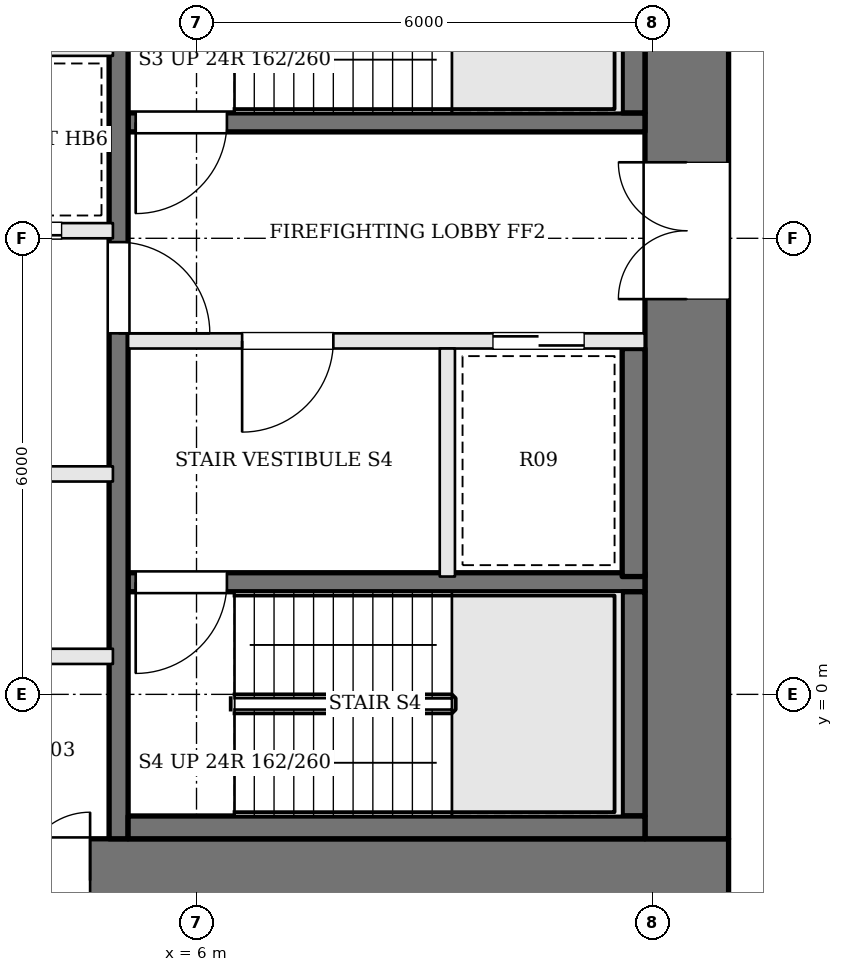
"""IFC4 building model, lengths in metres.
Left out: names, types, materials, properties, quantities, classifications, styles, units other than length and angle.
Written with IfcOpenShell. Run it as: python <this file> out.ifc"""

import sys

from ifc_helpers import new_model, si_unit, direction, frame, frame_2d, origin, place, context, subcontext, project, spatial, rectangle, extrude, element, fill, save


model = new_model("IFC4")
c1 = context("Model", 3, precision=1e-05, world=origin(), true_north=direction((0.0, 1.0)))
c2 = subcontext(c1, "Body", "Model", "MODEL_VIEW")
j1 = project(units=[si_unit("LENGTHUNIT", "METRE"), si_unit("PLANEANGLEUNIT", "RADIAN")], contexts=[c1])
p1 = place(None, origin())
s1 = spatial("IfcSite", under=j1, at=p1, CompositionType="ELEMENT")
p2 = place(p1, origin())
s2 = spatial("IfcBuilding", under=s1, at=p2, CompositionType="ELEMENT")
p3 = place(p2, frame((0.0, 0.0, 134.4)))
s3 = spatial("IfcBuildingStorey", under=s2, at=p3, CompositionType="ELEMENT", Elevation=134.4)
p4 = place(p3, frame((-13.0, -2.45, 0.0), z_axis=(0.0, 0.0, 1.0), x_axis=(1.0, 0.0, 0.0)))
e1 = element("IfcWall", 1, at=p4, inside=s3, PredefinedType="SHEAR", context=c2, shape_type="SweptSolid", body=[
    extrude(rectangle(XDim=26.0, YDim=1.1, at=frame_2d((13.0, 0.0))), origin(), (0.0, 0.0, 1.0), 3.9),
])
p5 = place(p4, frame((9.275, 0.0, 0.0)))
e2 = element("IfcOpeningElement", 2, at=p5, cuts=e1, PredefinedType="OPENING", context=c2, shape_type="SweptSolid", body=[
    extrude(rectangle(XDim=0.9, YDim=2.1, at=frame_2d((0.45, 1.05))), frame((0.0, 0.56, 0.0), z_axis=(0.0, -1.0, 0.0), x_axis=(1.0, 0.0, 0.0)), (0.0, 0.0, 1.0), 1.12),
])
p6 = place(p4, frame((11.75, 0.0, 0.0)))
e3 = element("IfcOpeningElement", 3, at=p6, cuts=e1, PredefinedType="OPENING", context=c2, shape_type="SweptSolid", body=[
    extrude(rectangle(XDim=1.0, YDim=2.1, at=frame_2d((0.5, 1.05))), frame((0.0, 0.56, 0.0), z_axis=(0.0, -1.0, 0.0), x_axis=(1.0, 0.0, 0.0)), (0.0, 0.0, 1.0), 1.12),
])
p7 = place(p4, frame((14.325, 0.0, 0.0)))
e4 = element("IfcOpeningElement", 4, at=p7, cuts=e1, PredefinedType="OPENING", context=c2, shape_type="SweptSolid", body=[
    extrude(rectangle(XDim=0.9, YDim=2.1, at=frame_2d((0.45, 1.05))), frame((0.0, 0.56, 0.0), z_axis=(0.0, -1.0, 0.0), x_axis=(1.0, 0.0, 0.0)), (0.0, 0.0, 1.0), 1.12),
])
p8 = place(p4, frame((16.7, 0.0, 0.0)))
e5 = element("IfcOpeningElement", 5, at=p8, cuts=e1, PredefinedType="OPENING", context=c2, shape_type="SweptSolid", body=[
    extrude(rectangle(XDim=0.9, YDim=2.1, at=frame_2d((0.45, 1.05))), frame((0.0, 0.56, 0.0), z_axis=(0.0, -1.0, 0.0), x_axis=(1.0, 0.0, 0.0)), (0.0, 0.0, 1.0), 1.12),
])
p9 = place(p3, frame((12.45, -1.9, 0.0), z_axis=(0.0, 0.0, 1.0), x_axis=(0.0, 1.0, 0.0)))
e6 = element("IfcWall", 6, at=p9, inside=s3, PredefinedType="SHEAR", context=c2, shape_type="SweptSolid", body=[
    extrude(rectangle(XDim=12.8, YDim=1.1, at=frame_2d((6.4, 0.0))), origin(), (0.0, 0.0, 1.0), 3.9),
])
p10 = place(p9, frame((7.1, 0.0, 0.0)))
e7 = element("IfcOpeningElement", 7, at=p10, cuts=e6, PredefinedType="OPENING", context=c2, shape_type="SweptSolid", body=[
    extrude(rectangle(XDim=1.8, YDim=2.1, at=frame_2d((0.9, 1.05))), frame((0.0, 0.56, 0.0), z_axis=(0.0, -1.0, 0.0), x_axis=(1.0, 0.0, 0.0)), (0.0, 0.0, 1.0), 1.12),
])
p11 = place(p3, frame((11.9, 7.525, 0.0), z_axis=(0.0, 0.0, 1.0), x_axis=(-1.0, 0.0, 0.0)))
e8 = element("IfcWall", 8, at=p11, inside=s3, PredefinedType="SOLIDWALL", context=c2, shape_type="SweptSolid", body=[
    extrude(rectangle(XDim=6.8, YDim=0.25, at=frame_2d((3.4, 0.0))), origin(), (0.0, 0.0, 1.0), 3.7),
])
p12 = place(p11, frame((5.5, 0.0, 0.0)))
e9 = element("IfcOpeningElement", 9, at=p12, cuts=e8, PredefinedType="OPENING", context=c2, shape_type="SweptSolid", body=[
    extrude(rectangle(XDim=1.2, YDim=2.1, at=frame_2d((0.6, 1.05))), frame((0.0, 0.135, 0.0), z_axis=(0.0, -1.0, 0.0), x_axis=(1.0, 0.0, 0.0)), (0.0, 0.0, 1.0), 0.27),
])
p13 = place(p3, frame((11.9, 4.65, 0.0), z_axis=(0.0, 0.0, 1.0), x_axis=(-1.0, 0.0, 0.0)))
e10 = element("IfcWall", 10, at=p13, inside=s3, PredefinedType="SOLIDWALL", context=c2, shape_type="SweptSolid", body=[
    extrude(rectangle(XDim=6.8, YDim=0.2, at=frame_2d((3.4, 0.0))), origin(), (0.0, 0.0, 1.0), 3.7),
])
p14 = place(p13, frame((4.1, 0.0, 0.0)))
e11 = element("IfcOpeningElement", 11, at=p14, cuts=e10, PredefinedType="OPENING", context=c2, shape_type="SweptSolid", body=[
    extrude(rectangle(XDim=1.2, YDim=2.1, at=frame_2d((0.6, 1.05))), frame((0.0, 0.11, 0.0), z_axis=(0.0, -1.0, 0.0), x_axis=(1.0, 0.0, 0.0)), (0.0, 0.0, 1.0), 0.22),
])
p15 = place(p13, frame((0.8, 0.0, 0.0)))
e12 = element("IfcOpeningElement", 12, at=p15, cuts=e10, PredefinedType="OPENING", context=c2, shape_type="SweptSolid", body=[
    extrude(rectangle(XDim=1.2, YDim=2.1, at=frame_2d((0.6, 1.05))), frame((0.0, 0.11, 0.0), z_axis=(0.0, -1.0, 0.0), x_axis=(1.0, 0.0, 0.0)), (0.0, 0.0, 1.0), 0.22),
])
p16 = place(p3, frame((11.9, 1.475, 0.0), z_axis=(0.0, 0.0, 1.0), x_axis=(-1.0, 0.0, 0.0)))
e13 = element("IfcWall", 13, at=p16, inside=s3, PredefinedType="SOLIDWALL", context=c2, shape_type="SweptSolid", body=[
    extrude(rectangle(XDim=6.8, YDim=0.25, at=frame_2d((3.4, 0.0))), origin(), (0.0, 0.0, 1.0), 3.7),
])
p17 = place(p16, frame((5.5, 0.0, 0.0)))
e14 = element("IfcOpeningElement", 14, at=p17, cuts=e13, PredefinedType="OPENING", context=c2, shape_type="SweptSolid", body=[
    extrude(rectangle(XDim=1.2, YDim=2.1, at=frame_2d((0.6, 1.05))), frame((0.0, 0.135, 0.0), z_axis=(0.0, -1.0, 0.0), x_axis=(1.0, 0.0, 0.0)), (0.0, 0.0, 1.0), 0.27),
])
p18 = place(p3, frame((9.3, 4.55, 0.0), z_axis=(0.0, 0.0, 1.0), x_axis=(0.0, -1.0, 0.0)))
e15 = element("IfcWall", 15, at=p18, inside=s3, PredefinedType="SOLIDWALL", context=c2, shape_type="SweptSolid", body=[
    extrude(rectangle(XDim=3.0, YDim=0.2, at=frame_2d((1.5, 0.0))), origin(), (0.0, 0.0, 1.0), 3.7),
])
p19 = place(p3, frame((4.975, 10.9, 0.0), z_axis=(0.0, 0.0, 1.0), x_axis=(0.0, -1.0, 0.0)))
e16 = element("IfcWall", 16, at=p19, inside=s3, PredefinedType="SOLIDWALL", context=c2, shape_type="SweptSolid", body=[
    extrude(rectangle(XDim=12.8, YDim=0.25, at=frame_2d((6.4, 0.0))), origin(), (0.0, 0.0, 1.0), 3.7),
])
p20 = place(p19, frame((4.95, 0.0, 0.0)))
e17 = element("IfcOpeningElement", 17, at=p20, cuts=e16, PredefinedType="OPENING", context=c2, shape_type="SweptSolid", body=[
    extrude(rectangle(XDim=1.2, YDim=2.1, at=frame_2d((0.6, 1.05))), frame((0.0, 0.135, 0.0), z_axis=(0.0, -1.0, 0.0), x_axis=(1.0, 0.0, 0.0)), (0.0, 0.0, 1.0), 0.27),
])
p21 = place(p3, frame((11.75, 10.6, 0.0), z_axis=(0.0, 0.0, 1.0), x_axis=(0.0, -1.0, 0.0)))
e18 = element("IfcWall", 18, at=p21, inside=s3, PredefinedType="SOLIDWALL", context=c2, shape_type="SweptSolid", body=[
    extrude(rectangle(XDim=2.95, YDim=0.3, at=frame_2d((1.475, 0.0))), origin(), (0.0, 0.0, 1.0), 3.7),
])
p22 = place(p3, frame((11.75, 4.55, 0.0), z_axis=(0.0, 0.0, 1.0), x_axis=(0.0, -1.0, 0.0)))
e19 = element("IfcWall", 19, at=p22, inside=s3, PredefinedType="SOLIDWALL", context=c2, shape_type="SweptSolid", body=[
    extrude(rectangle(XDim=3.0, YDim=0.3, at=frame_2d((1.5, 0.0))), origin(), (0.0, 0.0, 1.0), 3.7),
])
p23 = place(p3, frame((11.75, 1.35, 0.0), z_axis=(0.0, 0.0, 1.0), x_axis=(0.0, -1.0, 0.0)))
e20 = element("IfcWall", 20, at=p23, inside=s3, PredefinedType="SOLIDWALL", context=c2, shape_type="SweptSolid", body=[
    extrude(rectangle(XDim=2.95, YDim=0.3, at=frame_2d((1.475, 0.0))), origin(), (0.0, 0.0, 1.0), 3.7),
])
p24 = place(p3, frame((11.9, -1.75, 0.0), z_axis=(0.0, 0.0, 1.0), x_axis=(-1.0, 0.0, 0.0)))
e21 = element("IfcWall", 21, at=p24, inside=s3, PredefinedType="SOLIDWALL", context=c2, shape_type="SweptSolid", body=[
    extrude(rectangle(XDim=6.8, YDim=0.3, at=frame_2d((3.4, 0.0))), origin(), (0.0, 0.0, 1.0), 3.7),
])
p25 = place(p3, frame((-4.9, 0.5, 0.0), z_axis=(0.0, 0.0, 1.0), x_axis=(1.0, 0.0, 0.0)))
e22 = element("IfcWall", 22, at=p25, inside=s3, PredefinedType="SOLIDWALL", context=c2, shape_type="SweptSolid", body=[
    extrude(rectangle(XDim=9.8, YDim=0.2, at=frame_2d((4.9, 0.0))), origin(), (0.0, 0.0, 1.0), 3.7),
])
p26 = place(p3, frame((-4.9, 2.9, 0.0), z_axis=(0.0, 0.0, 1.0), x_axis=(1.0, 0.0, 0.0)))
e23 = element("IfcWall", 23, at=p26, inside=s3, PredefinedType="SOLIDWALL", context=c2, shape_type="SweptSolid", body=[
    extrude(rectangle(XDim=9.8, YDim=0.2, at=frame_2d((4.9, 0.0))), origin(), (0.0, 0.0, 1.0), 3.7),
])
p27 = place(p26, frame((0.675, 0.0, 0.0)))
e24 = element("IfcOpeningElement", 24, at=p27, cuts=e23, PredefinedType="OPENING", context=c2, shape_type="SweptSolid", body=[
    extrude(rectangle(XDim=1.1, YDim=2.1, at=frame_2d((0.55, 1.05))), frame((0.0, 0.11, 0.0), z_axis=(0.0, -1.0, 0.0), x_axis=(1.0, 0.0, 0.0)), (0.0, 0.0, 1.0), 0.22),
])
p28 = place(p26, frame((2.613, 0.0, 0.0)))
e25 = element("IfcOpeningElement", 25, at=p28, cuts=e23, PredefinedType="OPENING", context=c2, shape_type="SweptSolid", body=[
    extrude(rectangle(XDim=0.9, YDim=2.1, at=frame_2d((0.45, 1.05))), frame((0.0, 0.11, 0.0), z_axis=(0.0, -1.0, 0.0), x_axis=(1.0, 0.0, 0.0)), (0.0, 0.0, 1.0), 0.22),
])
p29 = place(p26, frame((4.35, 0.0, 0.0)))
e26 = element("IfcOpeningElement", 26, at=p29, cuts=e23, PredefinedType="OPENING", context=c2, shape_type="SweptSolid", body=[
    extrude(rectangle(XDim=1.1, YDim=2.1, at=frame_2d((0.55, 1.05))), frame((0.0, 0.11, 0.0), z_axis=(0.0, -1.0, 0.0), x_axis=(1.0, 0.0, 0.0)), (0.0, 0.0, 1.0), 0.22),
])
p30 = place(p26, frame((7.463, 0.0, 0.0)))
e27 = element("IfcOpeningElement", 27, at=p30, cuts=e23, PredefinedType="OPENING", context=c2, shape_type="SweptSolid", body=[
    extrude(rectangle(XDim=1.0, YDim=2.1, at=frame_2d((0.5, 1.05))), frame((0.0, 0.11, 0.0), z_axis=(0.0, -1.0, 0.0), x_axis=(1.0, 0.0, 0.0)), (0.0, 0.0, 1.0), 0.22),
])
p31 = place(p3, frame((-4.9, 6.1, 0.0), z_axis=(0.0, 0.0, 1.0), x_axis=(1.0, 0.0, 0.0)))
e28 = element("IfcWall", 28, at=p31, inside=s3, PredefinedType="SOLIDWALL", context=c2, shape_type="SweptSolid", body=[
    extrude(rectangle(XDim=9.8, YDim=0.2, at=frame_2d((4.9, 0.0))), origin(), (0.0, 0.0, 1.0), 3.7),
])
p32 = place(p31, frame((0.675, 0.0, 0.0)))
e29 = element("IfcOpeningElement", 29, at=p32, cuts=e28, PredefinedType="OPENING", context=c2, shape_type="SweptSolid", body=[
    extrude(rectangle(XDim=1.1, YDim=2.1, at=frame_2d((0.55, 1.05))), frame((0.0, 0.11, 0.0), z_axis=(0.0, -1.0, 0.0), x_axis=(1.0, 0.0, 0.0)), (0.0, 0.0, 1.0), 0.22),
])
p33 = place(p31, frame((3.125, 0.0, 0.0)))
e30 = element("IfcOpeningElement", 30, at=p33, cuts=e28, PredefinedType="OPENING", context=c2, shape_type="SweptSolid", body=[
    extrude(rectangle(XDim=1.1, YDim=2.1, at=frame_2d((0.55, 1.05))), frame((0.0, 0.11, 0.0), z_axis=(0.0, -1.0, 0.0), x_axis=(1.0, 0.0, 0.0)), (0.0, 0.0, 1.0), 0.22),
])
p34 = place(p31, frame((5.575, 0.0, 0.0)))
e31 = element("IfcOpeningElement", 31, at=p34, cuts=e28, PredefinedType="OPENING", context=c2, shape_type="SweptSolid", body=[
    extrude(rectangle(XDim=1.1, YDim=2.1, at=frame_2d((0.55, 1.05))), frame((0.0, 0.11, 0.0), z_axis=(0.0, -1.0, 0.0), x_axis=(1.0, 0.0, 0.0)), (0.0, 0.0, 1.0), 0.22),
])
p35 = place(p31, frame((8.025, 0.0, 0.0)))
e32 = element("IfcOpeningElement", 32, at=p35, cuts=e28, PredefinedType="OPENING", context=c2, shape_type="SweptSolid", body=[
    extrude(rectangle(XDim=1.1, YDim=2.1, at=frame_2d((0.55, 1.05))), frame((0.0, 0.11, 0.0), z_axis=(0.0, -1.0, 0.0), x_axis=(1.0, 0.0, 0.0)), (0.0, 0.0, 1.0), 0.22),
])
p36 = place(p3, frame((-4.9, 8.5, 0.0), z_axis=(0.0, 0.0, 1.0), x_axis=(1.0, 0.0, 0.0)))
e33 = element("IfcWall", 33, at=p36, inside=s3, PredefinedType="SOLIDWALL", context=c2, shape_type="SweptSolid", body=[
    extrude(rectangle(XDim=9.8, YDim=0.2, at=frame_2d((4.9, 0.0))), origin(), (0.0, 0.0, 1.0), 3.7),
])
p37 = place(p10, origin())
e34 = element("IfcDoor", 34, at=p37, inside=s3, OperationType="DOUBLE_DOOR_SINGLE_SWING", PredefinedType="DOOR", context=c2, shape_type="SweptSolid", body=[
    extrude(rectangle(XDim=1.8, YDim=2.1, at=frame_2d((0.9, 1.05))), frame((0.0, 0.025, 0.0), z_axis=(0.0, -1.0, 0.0), x_axis=(1.0, 0.0, 0.0)), (0.0, 0.0, 1.0), 0.05),
])
fill(e7, e34)
p38 = place(p20, origin())
e35 = element("IfcDoor", 35, at=p38, inside=s3, OperationType="SINGLE_SWING_RIGHT", PredefinedType="DOOR", context=c2, shape_type="SweptSolid", body=[
    extrude(rectangle(XDim=1.2, YDim=2.1, at=frame_2d((0.6, 1.05))), frame((0.0, 0.025, 0.0), z_axis=(0.0, -1.0, 0.0), x_axis=(1.0, 0.0, 0.0)), (0.0, 0.0, 1.0), 0.05),
])
fill(e17, e35)
p39 = place(p14, origin())
e36 = element("IfcDoor", 36, at=p39, inside=s3, OperationType="SINGLE_SWING_RIGHT", PredefinedType="DOOR", context=c2, shape_type="SweptSolid", body=[
    extrude(rectangle(XDim=1.2, YDim=2.1, at=frame_2d((0.6, 1.05))), frame((0.0, 0.025, 0.0), z_axis=(0.0, -1.0, 0.0), x_axis=(1.0, 0.0, 0.0)), (0.0, 0.0, 1.0), 0.05),
])
fill(e11, e36)
p40 = place(p12, origin())
e37 = element("IfcDoor", 37, at=p40, inside=s3, OperationType="SINGLE_SWING_RIGHT", PredefinedType="DOOR", context=c2, shape_type="SweptSolid", body=[
    extrude(rectangle(XDim=1.2, YDim=2.1, at=frame_2d((0.6, 1.05))), frame((0.0, 0.025, 0.0), z_axis=(0.0, -1.0, 0.0), x_axis=(1.0, 0.0, 0.0)), (0.0, 0.0, 1.0), 0.05),
])
fill(e9, e37)
p41 = place(p17, origin())
e38 = element("IfcDoor", 38, at=p41, inside=s3, OperationType="SINGLE_SWING_RIGHT", PredefinedType="DOOR", context=c2, shape_type="SweptSolid", body=[
    extrude(rectangle(XDim=1.2, YDim=2.1, at=frame_2d((0.6, 1.05))), frame((0.0, 0.025, 0.0), z_axis=(0.0, -1.0, 0.0), x_axis=(1.0, 0.0, 0.0)), (0.0, 0.0, 1.0), 0.05),
])
fill(e14, e38)
p42 = place(p15, origin())
e39 = element("IfcDoor", 39, at=p42, inside=s3, OperationType="SLIDING_TO_RIGHT", PredefinedType="DOOR", context=c2, shape_type="SweptSolid", body=[
    extrude(rectangle(XDim=1.2, YDim=2.1, at=frame_2d((0.6, 1.05))), frame((0.0, 0.025, 0.0), z_axis=(0.0, -1.0, 0.0), x_axis=(1.0, 0.0, 0.0)), (0.0, 0.0, 1.0), 0.05),
])
fill(e12, e39)
p43 = place(p35, origin())
e40 = element("IfcDoor", 40, at=p43, inside=s3, OperationType="SLIDING_TO_LEFT", PredefinedType="DOOR", context=c2, shape_type="SweptSolid", body=[
    extrude(rectangle(XDim=1.1, YDim=2.1, at=frame_2d((0.55, 1.05))), frame((0.0, 0.025, 0.0), z_axis=(0.0, -1.0, 0.0), x_axis=(1.0, 0.0, 0.0)), (0.0, 0.0, 1.0), 0.05),
])
fill(e32, e40)
p44 = place(p8, origin())
e41 = element("IfcDoor", 41, at=p44, inside=s3, OperationType="SINGLE_SWING_RIGHT", PredefinedType="DOOR", context=c2, shape_type="SweptSolid", body=[
    extrude(rectangle(XDim=0.9, YDim=2.1, at=frame_2d((0.45, 1.05))), frame((0.0, 0.025, 0.0), z_axis=(0.0, -1.0, 0.0), x_axis=(1.0, 0.0, 0.0)), (0.0, 0.0, 1.0), 0.05),
])
fill(e5, e41)
save(model, sys.argv[1])
